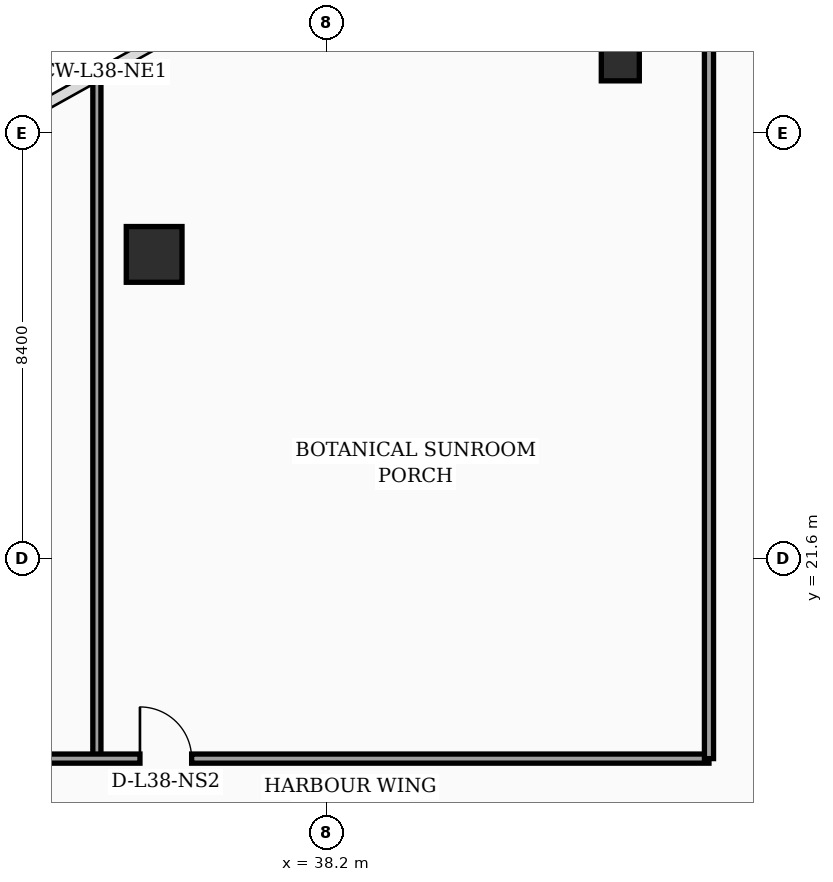
"""IFC4 building model, lengths in metres.
Left out: names, types, materials, properties, quantities, classifications, styles, units other than length and angle.
Written with IfcOpenShell. Run it as: python <this file> out.ifc"""

import sys

from ifc_helpers import new_model, si_unit, direction, frame, frame_2d, origin, origin_2d, place, context, subcontext, project, spatial, rectangle, hollow_rectangle, circle, extrude, element, fill, save


model = new_model("IFC4")
c1 = context("Model", 3, precision=1e-05, world=origin(), true_north=direction((0.0, 1.0)))
c2 = subcontext(c1, "Body", "Model", "MODEL_VIEW")
j1 = project(units=[si_unit("LENGTHUNIT", "METRE"), si_unit("PLANEANGLEUNIT", "RADIAN")], contexts=[c1])
p1 = place(None, origin())
s1 = spatial("IfcSite", under=j1, at=p1, CompositionType="ELEMENT")
p2 = place(p1, origin())
s2 = spatial("IfcBuilding", under=s1, at=p2, CompositionType="ELEMENT")
p3 = place(p2, frame((0.0, 0.0, 156.1)))
s3 = spatial("IfcBuildingStorey", under=s2, at=p3, CompositionType="ELEMENT", Elevation=156.1)
p4 = place(p3, frame((34.8, 27.6, 0.0), z_axis=(0.0, 0.0, 1.0), x_axis=(1.0, 0.0, 0.0)))
e1 = element("IfcColumn", 1, at=p4, inside=s3, PredefinedType="COLUMN", context=c2, shape_type="SweptSolid", body=[
    extrude(circle(Radius=0.55, at=origin_2d()), origin(), (0.0, 0.0, 1.0), 3.56),
])
p5 = place(p3, frame((44.0, 31.4, 0.0), z_axis=(0.0, 0.0, 1.0), x_axis=(1.0, 0.0, 0.0)))
e2 = element("IfcColumn", 2, at=p5, inside=s3, PredefinedType="COLUMN", context=c2, shape_type="SweptSolid", body=[
    extrude(hollow_rectangle(XDim=0.75, YDim=0.75, WallThickness=0.032, at=origin_2d()), origin(), (0.0, 0.0, 1.0), 3.56),
])
p6 = place(p3, frame((33.67, 17.65, 0.0), z_axis=(0.0, 0.0, 1.0), x_axis=(0.0, 1.0, 0.0)))
e3 = element("IfcWall", 3, at=p6, inside=s3, PredefinedType="PARTITIONING", context=c2, shape_type="SweptSolid", body=[
    extrude(rectangle(XDim=13.56, YDim=0.16, at=frame_2d((6.78, 0.0))), origin(), (0.0, 0.0, 1.0), 2.94),
])
p7 = place(p3, frame((21.5, 17.65, 0.0), z_axis=(0.0, 0.0, 1.0), x_axis=(1.0, 0.0, 0.0)))
e4 = element("IfcWall", 4, at=p7, inside=s3, PredefinedType="PARTITIONING", context=c2, shape_type="SweptSolid", body=[
    extrude(rectangle(XDim=24.25, YDim=0.18, at=frame_2d((12.125, 0.0))), origin(), (0.0, 0.0, 1.0), 2.94),
])
p8 = place(p7, frame((0.95, 0.0, 0.0)))
e5 = element("IfcOpeningElement", 5, at=p8, cuts=e4, PredefinedType="OPENING", context=c2, shape_type="SweptSolid", body=[
    extrude(rectangle(XDim=1.02, YDim=2.2, at=frame_2d((0.51, 1.1))), frame((0.0, 0.1, 0.0), z_axis=(0.0, -1.0, 0.0), x_axis=(1.0, 0.0, 0.0)), (0.0, 0.0, 1.0), 0.2),
])
p9 = place(p7, frame((13.02, 0.0, 0.0)))
e6 = element("IfcOpeningElement", 6, at=p9, cuts=e4, PredefinedType="OPENING", context=c2, shape_type="SweptSolid", body=[
    extrude(rectangle(XDim=1.02, YDim=2.2, at=frame_2d((0.51, 1.1))), frame((0.0, 0.1, 0.0), z_axis=(0.0, -1.0, 0.0), x_axis=(1.0, 0.0, 0.0)), (0.0, 0.0, 1.0), 0.2),
])
p10 = place(p3, frame((45.75, 17.65, 0.0), z_axis=(0.0, 0.0, 1.0), x_axis=(0.0, 1.0, 0.0)))
e7 = element("IfcWall", 7, at=p10, inside=s3, PredefinedType="PARTITIONING", context=c2, shape_type="SweptSolid", body=[
    extrude(rectangle(XDim=20.29, YDim=0.18, at=frame_2d((10.145, 0.0))), origin(), (0.0, 0.0, 1.0), 2.94),
])
p11 = place(p9, origin())
e8 = element("IfcDoor", 8, at=p11, inside=s3, OperationType="SINGLE_SWING_LEFT", PredefinedType="DOOR", context=c2, shape_type="SweptSolid", body=[
    extrude(rectangle(XDim=1.02, YDim=2.2, at=frame_2d((0.51, 1.1))), frame((0.0, 0.025, 0.0), z_axis=(0.0, -1.0, 0.0), x_axis=(1.0, 0.0, 0.0)), (0.0, 0.0, 1.0), 0.05),
])
fill(e6, e8)
save(model, sys.argv[1])
